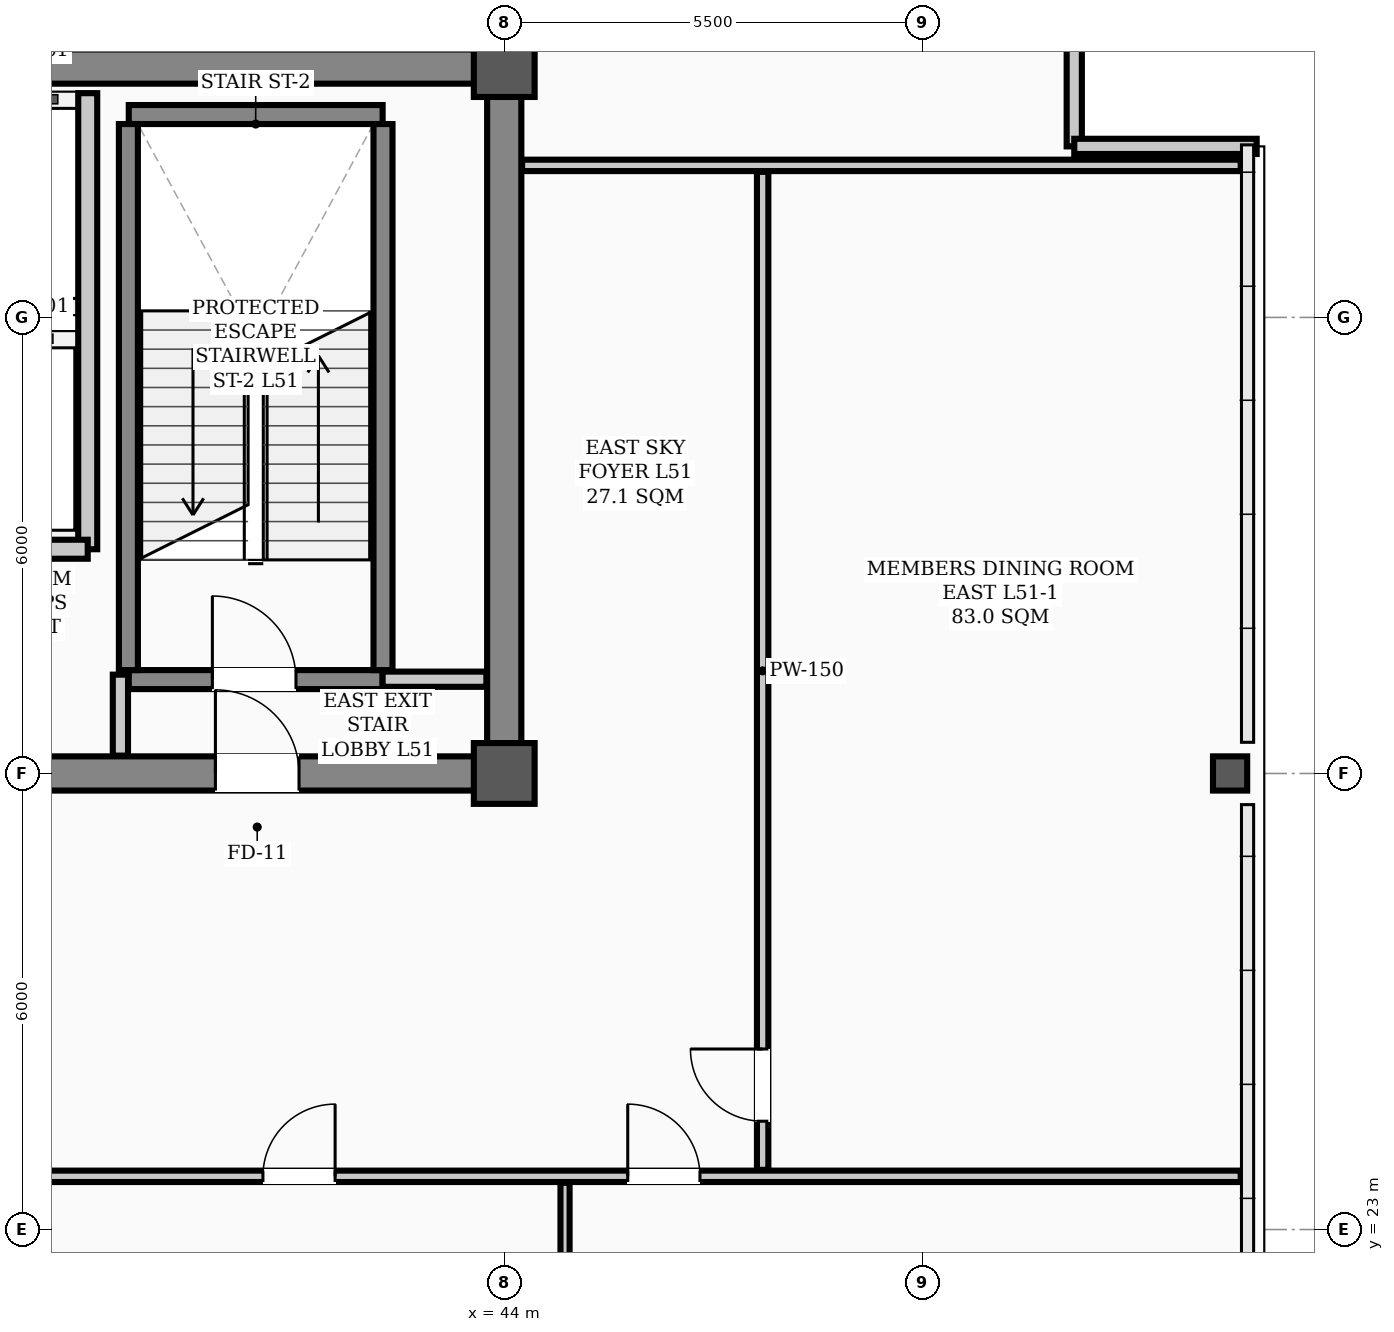
"""IFC4 building model, lengths in metres.
Left out: names, types, materials, properties, quantities, classifications, styles, units other than length and angle.
Written with IfcOpenShell. Run it as: python <this file> out.ifc"""

import sys

from ifc_helpers import new_model, si_unit, direction, frame, frame_2d, origin, origin_2d, place, context, subcontext, project, spatial, rectangle, hollow_rectangle, extrude, element, fill, save


model = new_model("IFC4")
c1 = context("Model", 3, precision=1e-05, world=origin(), true_north=direction((0.0, 1.0)))
c2 = subcontext(c1, "Body", "Model", "MODEL_VIEW")
j1 = project(units=[si_unit("LENGTHUNIT", "METRE"), si_unit("PLANEANGLEUNIT", "RADIAN")], contexts=[c1])
p1 = place(None, origin())
s1 = spatial("IfcSite", under=j1, at=p1, CompositionType="ELEMENT")
p2 = place(p1, origin())
s2 = spatial("IfcBuilding", under=s1, at=p2, CompositionType="ELEMENT")
p3 = place(p2, frame((0.0, 0.0, 206.1)))
s3 = spatial("IfcBuildingStorey", under=s2, at=p3, CompositionType="ELEMENT", Elevation=206.1)
for number, where, z_axis, x_axis in (
    (1, (44.0, 29.0, 0.0), (0.0, 0.0, 1.0), (1.0, 0.0, 0.0)),
    (2, (44.0, 38.3, 0.0), (0.0, 0.0, 1.0), (1.0, 0.0, 0.0)),
):
    element("IfcColumn", number, at=place(p3, frame(where, z_axis=z_axis, x_axis=x_axis)), inside=s3, PredefinedType="COLUMN", context=c2, shape_type="SweptSolid", body=[
        extrude(hollow_rectangle(XDim=0.8, YDim=0.8, WallThickness=0.032, InnerFilletRadius=0.016, OuterFilletRadius=0.048, at=origin_2d()), origin(), (0.0, 0.0, 1.0), 5.0),
    ])
p4 = place(p3, frame((53.55, 29.0, 0.0), z_axis=(0.0, 0.0, 1.0), x_axis=(1.0, 0.0, 0.0)))
e3 = element("IfcColumn", 3, at=p4, inside=s3, PredefinedType="COLUMN", context=c2, shape_type="SweptSolid", body=[
    extrude(hollow_rectangle(XDim=0.45, YDim=0.45, WallThickness=0.022, InnerFilletRadius=0.022, OuterFilletRadius=0.044, at=origin_2d()), origin(), (0.0, 0.0, 1.0), 5.0),
])
for number, where, z_axis, x_axis in (
    (4, (51.5, 39.65, 0.0), (0.0, 0.0, 1.0), (0.0, -1.0, 0.0)),
    (5, (51.5, 37.25, 0.0), (0.0, 0.0, 1.0), (1.0, 0.0, 0.0)),
):
    element("IfcWall", number, at=place(p3, frame(where, z_axis=z_axis, x_axis=x_axis)), inside=s3, PredefinedType="PARAPET", context=c2, shape_type="SweptSolid", body=[
        extrude(rectangle(XDim=2.4, YDim=0.2, at=frame_2d((1.2, 0.0))), origin(), (0.0, 0.0, 1.0), 1.2),
    ])
p5 = place(p3, frame((13.5, 29.0, 0.0), z_axis=(0.0, 0.0, 1.0), x_axis=(1.0, 0.0, 0.0)))
e6 = element("IfcWall", 6, at=p5, inside=s3, PredefinedType="SHEAR", context=c2, shape_type="SweptSolid", body=[
    extrude(rectangle(XDim=30.5, YDim=0.45, at=frame_2d((15.25, 0.0))), origin(), (0.0, 0.0, 1.0), 4.82),
])
p6 = place(p5, frame((1.75, 0.0, 0.0)))
e7 = element("IfcOpeningElement", 7, at=p6, cuts=e6, PredefinedType="OPENING", context=c2, shape_type="SweptSolid", body=[
    extrude(rectangle(XDim=1.1, YDim=2.08, at=frame_2d((0.55, 1.04))), frame((0.0, 0.235, 0.0), z_axis=(0.0, -1.0, 0.0), x_axis=(1.0, 0.0, 0.0)), (0.0, 0.0, 1.0), 0.47),
])
p7 = place(p5, frame((26.7, 0.0, 0.0)))
e8 = element("IfcOpeningElement", 8, at=p7, cuts=e6, PredefinedType="OPENING", context=c2, shape_type="SweptSolid", body=[
    extrude(rectangle(XDim=1.1, YDim=2.08, at=frame_2d((0.55, 1.04))), frame((0.0, 0.235, 0.0), z_axis=(0.0, -1.0, 0.0), x_axis=(1.0, 0.0, 0.0)), (0.0, 0.0, 1.0), 0.47),
])
p8 = place(p5, frame((6.8, 0.0, 0.0)))
e9 = element("IfcOpeningElement", 9, at=p8, cuts=e6, PredefinedType="OPENING", context=c2, shape_type="SweptSolid", body=[
    extrude(rectangle(XDim=1.1, YDim=2.08, at=frame_2d((0.55, 1.04))), frame((0.0, 0.235, 0.0), z_axis=(0.0, -1.0, 0.0), x_axis=(1.0, 0.0, 0.0)), (0.0, 0.0, 1.0), 0.47),
])
p9 = place(p5, frame((13.2, 0.0, 0.0)))
e10 = element("IfcOpeningElement", 10, at=p9, cuts=e6, PredefinedType="OPENING", context=c2, shape_type="SweptSolid", body=[
    extrude(rectangle(XDim=1.6, YDim=2.08, at=frame_2d((0.8, 1.04))), frame((0.0, 0.235, 0.0), z_axis=(0.0, -1.0, 0.0), x_axis=(1.0, 0.0, 0.0)), (0.0, 0.0, 1.0), 0.47),
])
p10 = place(p5, frame((19.6, 0.0, 0.0)))
e11 = element("IfcOpeningElement", 11, at=p10, cuts=e6, PredefinedType="OPENING", context=c2, shape_type="SweptSolid", body=[
    extrude(rectangle(XDim=0.9, YDim=2.08, at=frame_2d((0.45, 1.04))), frame((0.0, 0.235, 0.0), z_axis=(0.0, -1.0, 0.0), x_axis=(1.0, 0.0, 0.0)), (0.0, 0.0, 1.0), 0.47),
])
p11 = place(p5, frame((21.6, 0.0, 0.0)))
e12 = element("IfcOpeningElement", 12, at=p11, cuts=e6, PredefinedType="OPENING", context=c2, shape_type="SweptSolid", body=[
    extrude(rectangle(XDim=0.9, YDim=2.08, at=frame_2d((0.45, 1.04))), frame((0.0, 0.235, 0.0), z_axis=(0.0, -1.0, 0.0), x_axis=(1.0, 0.0, 0.0)), (0.0, 0.0, 1.0), 0.47),
])
p12 = place(p3, frame((13.5, 38.3, 0.0), z_axis=(0.0, 0.0, 1.0), x_axis=(1.0, 0.0, 0.0)))
e13 = element("IfcWall", 13, at=p12, inside=s3, PredefinedType="SHEAR", context=c2, shape_type="SweptSolid", body=[
    extrude(rectangle(XDim=30.5, YDim=0.45, at=frame_2d((15.25, 0.0))), origin(), (0.0, 0.0, 1.0), 4.82),
])
p13 = place(p3, frame((44.0, 29.35, 0.0), z_axis=(0.0, 0.0, 1.0), x_axis=(0.0, 1.0, 0.0)))
e14 = element("IfcWall", 14, at=p13, inside=s3, PredefinedType="SHEAR", context=c2, shape_type="SweptSolid", body=[
    extrude(rectangle(XDim=8.6, YDim=0.45, at=frame_2d((4.3, 0.0))), origin(), (0.0, 0.0, 1.0), 4.82),
])
p14 = place(p3, frame((39.06, 30.235, 0.0), z_axis=(0.0, 0.0, 1.0), x_axis=(1.0, 0.0, 0.0)))
e15 = element("IfcWall", 15, at=p14, inside=s3, PredefinedType="STANDARD", context=c2, shape_type="SweptSolid", body=[
    extrude(rectangle(XDim=3.34, YDim=0.25, at=frame_2d((1.67, 0.0))), origin(), (0.0, 0.0, 1.0), 4.82),
])
p15 = place(p14, frame((1.1, 0.0, 0.0)))
e16 = element("IfcOpeningElement", 16, at=p15, cuts=e15, PredefinedType="OPENING", context=c2, shape_type="SweptSolid", body=[
    extrude(rectangle(XDim=1.1, YDim=2.08, at=frame_2d((0.55, 1.04))), frame((0.0, 0.135, 0.0), z_axis=(0.0, -1.0, 0.0), x_axis=(1.0, 0.0, 0.0)), (0.0, 0.0, 1.0), 0.27),
])
p16 = place(p3, frame((39.06, 37.669, 0.0), z_axis=(0.0, 0.0, 1.0), x_axis=(1.0, 0.0, 0.0)))
e17 = element("IfcWall", 17, at=p16, inside=s3, PredefinedType="STANDARD", context=c2, shape_type="SweptSolid", body=[
    extrude(rectangle(XDim=3.34, YDim=0.25, at=frame_2d((1.67, 0.0))), origin(), (0.0, 0.0, 1.0), 4.82),
])
for number, where, z_axis, x_axis in (
    (18, (39.055, 30.36, 0.0), (0.0, 0.0, 1.0), (0.0, 1.0, 0.0)),
    (19, (42.405, 30.36, 0.0), (0.0, 0.0, 1.0), (0.0, 1.0, 0.0)),
):
    element("IfcWall", number, at=place(p3, frame(where, z_axis=z_axis, x_axis=x_axis)), inside=s3, PredefinedType="STANDARD", context=c2, shape_type="SweptSolid", body=[
        extrude(rectangle(XDim=7.184, YDim=0.25, at=frame_2d((3.592, 0.0))), origin(), (0.0, 0.0, 1.0), 4.82),
    ])
p17 = place(p3, frame((38.52, 31.95, 0.0), z_axis=(0.0, 0.0, 1.0), x_axis=(0.0, 1.0, 0.0)))
e20 = element("IfcWall", 20, at=p17, inside=s3, PredefinedType="STANDARD", context=c2, shape_type="SweptSolid", body=[
    extrude(rectangle(XDim=6.0, YDim=0.25, at=frame_2d((3.0, 0.0))), origin(), (0.0, 0.0, 1.0), 4.58),
])
p18 = place(p3, frame((36.62, 31.95, 0.0), z_axis=(0.0, 0.0, 1.0), x_axis=(1.0, 0.0, 0.0)))
e21 = element("IfcWall", 21, at=p18, inside=s3, PredefinedType="STANDARD", context=c2, shape_type="SweptSolid", body=[
    extrude(rectangle(XDim=1.9, YDim=0.25, at=frame_2d((0.95, 0.0))), origin(), (0.0, 0.0, 1.0), 4.58),
])
p19 = place(p3, frame((42.4, 30.24, 0.0), z_axis=(0.0, 0.0, 1.0), x_axis=(1.0, 0.0, 0.0)))
e22 = element("IfcWall", 22, at=p19, inside=s3, PredefinedType="STANDARD", context=c2, shape_type="SweptSolid", body=[
    extrude(rectangle(XDim=1.365, YDim=0.2, at=frame_2d((0.683, 0.0))), origin(), (0.0, 0.0, 1.0), 4.3),
])
p20 = place(p3, frame((10.31, 23.7, 0.0), z_axis=(0.0, 0.0, 1.0), x_axis=(1.0, 0.0, 0.0)))
e23 = element("IfcWall", 23, at=p20, inside=s3, PredefinedType="PARTITIONING", context=c2, shape_type="SweptSolid", body=[
    extrude(rectangle(XDim=43.38, YDim=0.15, at=frame_2d((21.69, 0.0))), origin(), (0.0, 0.0, 1.0), 4.3),
])
p21 = place(p20, frame((0.57, 0.0, 0.0)))
e24 = element("IfcOpeningElement", 24, at=p21, cuts=e23, PredefinedType="OPENING", context=c2, shape_type="SweptSolid", body=[
    extrude(rectangle(XDim=0.95, YDim=2.08, at=frame_2d((0.475, 1.04))), frame((0.0, 0.085, 0.0), z_axis=(0.0, -1.0, 0.0), x_axis=(1.0, 0.0, 0.0)), (0.0, 0.0, 1.0), 0.17),
])
p22 = place(p20, frame((7.115, 0.0, 0.0)))
e25 = element("IfcOpeningElement", 25, at=p22, cuts=e23, PredefinedType="OPENING", context=c2, shape_type="SweptSolid", body=[
    extrude(rectangle(XDim=0.95, YDim=2.08, at=frame_2d((0.475, 1.04))), frame((0.0, 0.085, 0.0), z_axis=(0.0, -1.0, 0.0), x_axis=(1.0, 0.0, 0.0)), (0.0, 0.0, 1.0), 0.17),
])
p23 = place(p20, frame((15.115, 0.0, 0.0)))
e26 = element("IfcOpeningElement", 26, at=p23, cuts=e23, PredefinedType="OPENING", context=c2, shape_type="SweptSolid", body=[
    extrude(rectangle(XDim=0.95, YDim=2.08, at=frame_2d((0.475, 1.04))), frame((0.0, 0.085, 0.0), z_axis=(0.0, -1.0, 0.0), x_axis=(1.0, 0.0, 0.0)), (0.0, 0.0, 1.0), 0.17),
])
p24 = place(p20, frame((23.215, 0.0, 0.0)))
e27 = element("IfcOpeningElement", 27, at=p24, cuts=e23, PredefinedType="OPENING", context=c2, shape_type="SweptSolid", body=[
    extrude(rectangle(XDim=0.95, YDim=2.08, at=frame_2d((0.475, 1.04))), frame((0.0, 0.085, 0.0), z_axis=(0.0, -1.0, 0.0), x_axis=(1.0, 0.0, 0.0)), (0.0, 0.0, 1.0), 0.17),
])
p25 = place(p20, frame((30.515, 0.0, 0.0)))
e28 = element("IfcOpeningElement", 28, at=p25, cuts=e23, PredefinedType="OPENING", context=c2, shape_type="SweptSolid", body=[
    extrude(rectangle(XDim=0.95, YDim=2.08, at=frame_2d((0.475, 1.04))), frame((0.0, 0.085, 0.0), z_axis=(0.0, -1.0, 0.0), x_axis=(1.0, 0.0, 0.0)), (0.0, 0.0, 1.0), 0.17),
])
p26 = place(p20, frame((35.315, 0.0, 0.0)))
e29 = element("IfcOpeningElement", 29, at=p26, cuts=e23, PredefinedType="OPENING", context=c2, shape_type="SweptSolid", body=[
    extrude(rectangle(XDim=0.95, YDim=2.08, at=frame_2d((0.475, 1.04))), frame((0.0, 0.085, 0.0), z_axis=(0.0, -1.0, 0.0), x_axis=(1.0, 0.0, 0.0)), (0.0, 0.0, 1.0), 0.17),
])
p27 = place(p3, frame((44.235, 37.0, 0.0), z_axis=(0.0, 0.0, 1.0), x_axis=(1.0, 0.0, 0.0)))
e30 = element("IfcWall", 30, at=p27, inside=s3, PredefinedType="PARTITIONING", context=c2, shape_type="SweptSolid", body=[
    extrude(rectangle(XDim=9.455, YDim=0.15, at=frame_2d((4.728, 0.0))), origin(), (0.0, 0.0, 1.0), 4.3),
])
p28 = place(p3, frame((38.95, 29.235, 0.0), z_axis=(0.0, 0.0, 1.0), x_axis=(0.0, 1.0, 0.0)))
e31 = element("IfcWall", 31, at=p28, inside=s3, PredefinedType="STANDARD", context=c2, shape_type="SweptSolid", body=[
    extrude(rectangle(XDim=1.065, YDim=0.2, at=frame_2d((0.532, 0.0))), origin(), (0.0, 0.0, 1.0), 4.45),
])
p29 = place(p3, frame((47.4, 23.785, 0.0), z_axis=(0.0, 0.0, 1.0), x_axis=(0.0, 1.0, 0.0)))
e32 = element("IfcWall", 32, at=p29, inside=s3, PredefinedType="PARTITIONING", context=c2, shape_type="SweptSolid", body=[
    extrude(rectangle(XDim=13.13, YDim=0.15, at=frame_2d((6.565, 0.0))), origin(), (0.0, 0.0, 1.0), 4.2),
])
p30 = place(p29, frame((0.64, 0.0, 0.0)))
e33 = element("IfcOpeningElement", 33, at=p30, cuts=e32, PredefinedType="OPENING", context=c2, shape_type="SweptSolid", body=[
    extrude(rectangle(XDim=0.95, YDim=2.08, at=frame_2d((0.475, 1.04))), frame((0.0, 0.085, 0.0), z_axis=(0.0, -1.0, 0.0), x_axis=(1.0, 0.0, 0.0)), (0.0, 0.0, 1.0), 0.17),
])
p31 = place(p3, frame((44.8, 11.56, 0.0), z_axis=(0.0, 0.0, 1.0), x_axis=(0.0, 1.0, 0.0)))
e34 = element("IfcWall", 34, at=p31, inside=s3, PredefinedType="PARTITIONING", context=c2, shape_type="SweptSolid", body=[
    extrude(rectangle(XDim=12.055, YDim=0.12, at=frame_2d((6.027, 0.0))), origin(), (0.0, 0.0, 1.0), 4.2),
])
p32 = place(p15, origin())
e35 = element("IfcDoor", 35, at=p32, inside=s3, OperationType="SINGLE_SWING_LEFT", PredefinedType="DOOR", context=c2, shape_type="SweptSolid", body=[
    extrude(rectangle(XDim=1.1, YDim=2.08, at=frame_2d((0.55, 1.04))), frame((0.0, 0.025, 0.0), z_axis=(0.0, -1.0, 0.0), x_axis=(1.0, 0.0, 0.0)), (0.0, 0.0, 1.0), 0.05),
])
fill(e16, e35)
p33 = place(p7, origin())
e36 = element("IfcDoor", 36, at=p33, inside=s3, OperationType="SINGLE_SWING_LEFT", PredefinedType="DOOR", context=c2, shape_type="SweptSolid", body=[
    extrude(rectangle(XDim=1.1, YDim=2.08, at=frame_2d((0.55, 1.04))), frame((0.0, 0.025, 0.0), z_axis=(0.0, -1.0, 0.0), x_axis=(1.0, 0.0, 0.0)), (0.0, 0.0, 1.0), 0.05),
])
fill(e8, e36)
p34 = place(p25, origin())
e37 = element("IfcDoor", 37, at=p34, inside=s3, OperationType="SINGLE_SWING_RIGHT", PredefinedType="DOOR", context=c2, shape_type="SweptSolid", body=[
    extrude(rectangle(XDim=0.95, YDim=2.08, at=frame_2d((0.475, 1.04))), frame((0.0, 0.025, 0.0), z_axis=(0.0, -1.0, 0.0), x_axis=(1.0, 0.0, 0.0)), (0.0, 0.0, 1.0), 0.05),
])
fill(e28, e37)
p35 = place(p26, origin())
e38 = element("IfcDoor", 38, at=p35, inside=s3, OperationType="SINGLE_SWING_LEFT", PredefinedType="DOOR", context=c2, shape_type="SweptSolid", body=[
    extrude(rectangle(XDim=0.95, YDim=2.08, at=frame_2d((0.475, 1.04))), frame((0.0, 0.025, 0.0), z_axis=(0.0, -1.0, 0.0), x_axis=(1.0, 0.0, 0.0)), (0.0, 0.0, 1.0), 0.05),
])
fill(e29, e38)
p36 = place(p30, origin())
e39 = element("IfcDoor", 39, at=p36, inside=s3, OperationType="SINGLE_SWING_RIGHT", PredefinedType="DOOR", context=c2, shape_type="SweptSolid", body=[
    extrude(rectangle(XDim=0.95, YDim=2.08, at=frame_2d((0.475, 1.04))), frame((0.0, 0.025, 0.0), z_axis=(0.0, -1.0, 0.0), x_axis=(1.0, 0.0, 0.0)), (0.0, 0.0, 1.0), 0.05),
])
fill(e33, e39)
save(model, sys.argv[1])
